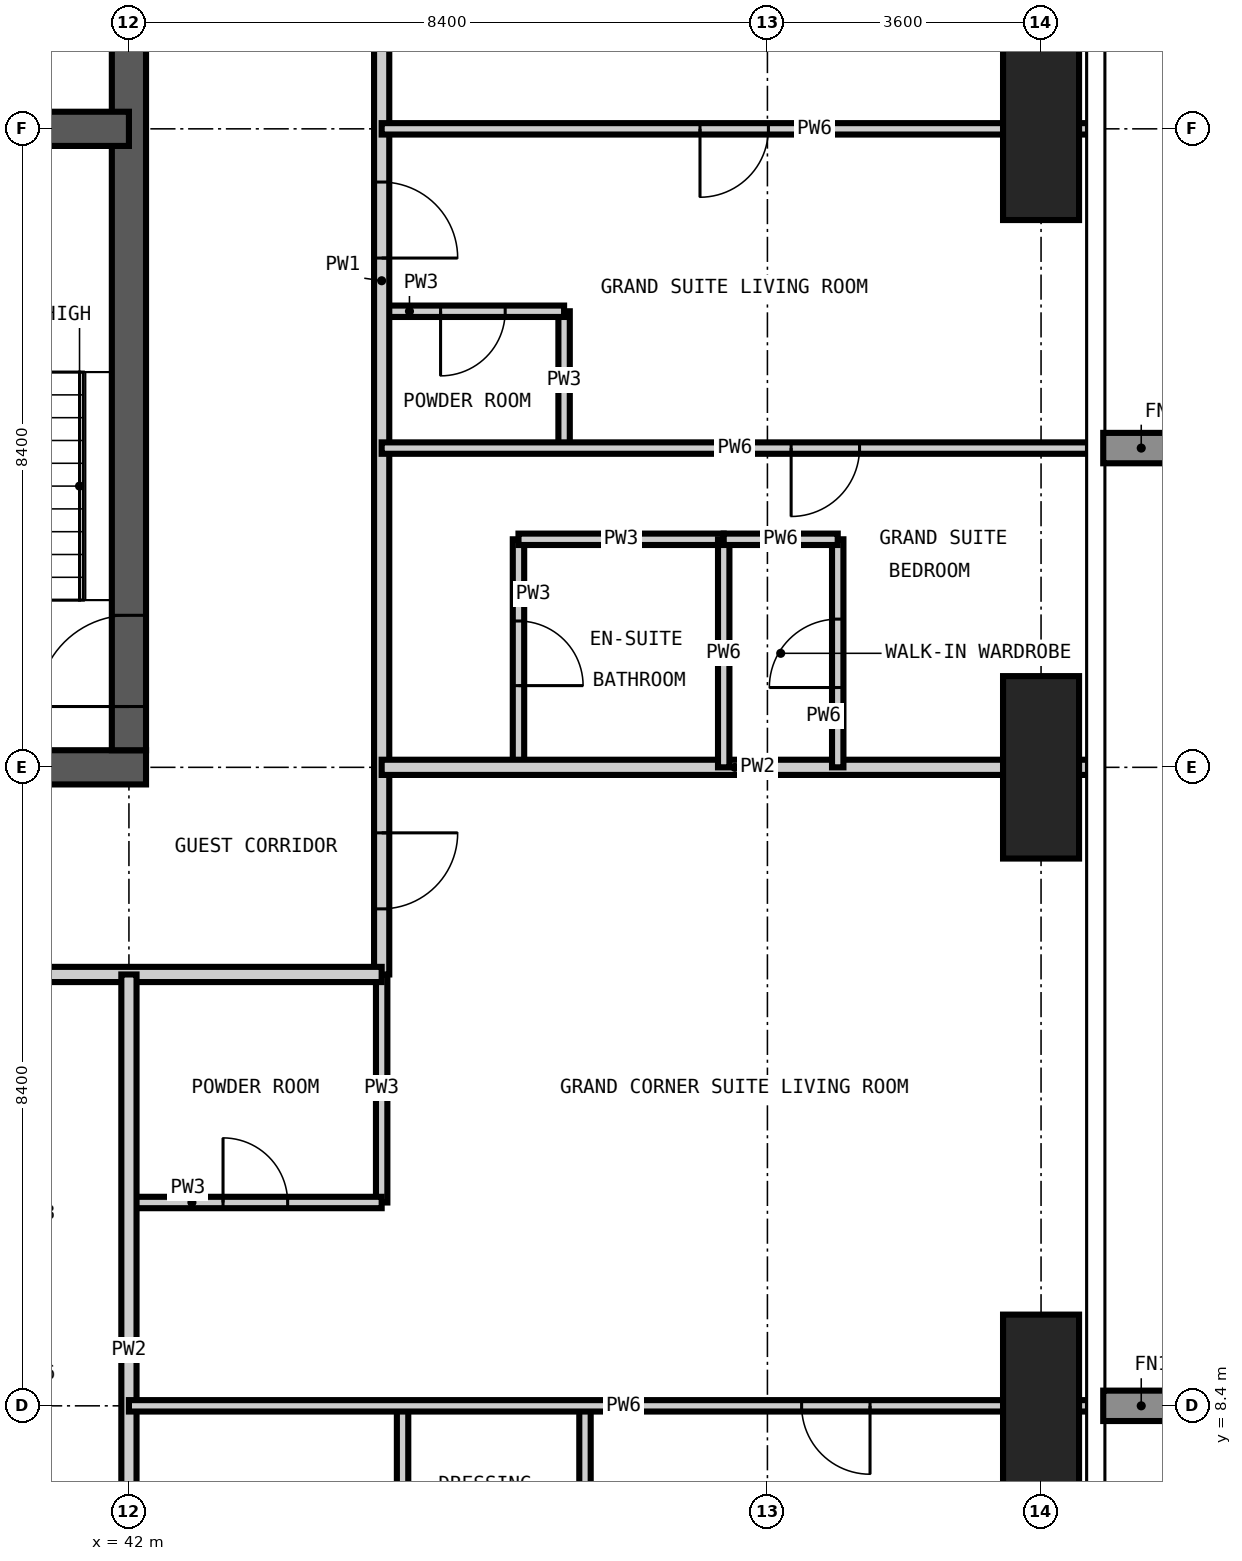
"""IFC4 building model, lengths in metres.
Left out: names, types, materials, properties, quantities, classifications, styles, units other than length and angle.
Written with IfcOpenShell. Run it as: python <this file> out.ifc"""

import sys

from ifc_helpers import new_model, si_unit, direction, frame, frame_2d, origin, origin_2d, place, context, subcontext, project, spatial, rectangle, extrude, element, fill, save


model = new_model("IFC4")
c1 = context("Model", 3, precision=1e-05, world=origin(), true_north=direction((0.0, 1.0)))
c2 = subcontext(c1, "Body", "Model", "MODEL_VIEW")
j1 = project(units=[si_unit("LENGTHUNIT", "METRE"), si_unit("PLANEANGLEUNIT", "RADIAN")], contexts=[c1])
p1 = place(None, origin())
s1 = spatial("IfcSite", under=j1, at=p1, CompositionType="ELEMENT")
p2 = place(p1, origin())
s2 = spatial("IfcBuilding", under=s1, at=p2, CompositionType="ELEMENT")
p3 = place(p2, frame((0.0, 0.0, 264.6)))
s3 = spatial("IfcBuildingStorey", under=s2, at=p3, CompositionType="ELEMENT", Elevation=264.6)
for number, where, z_axis, x_axis in (
    (1, (54.0, 8.4, -0.35), (0.0, 0.0, 1.0), (1.0, 0.0, 0.0)),
    (2, (54.0, 16.8, -0.35), (0.0, 0.0, 1.0), (1.0, 0.0, 0.0)),
    (3, (54.0, 25.2, -0.35), (0.0, 0.0, 1.0), (1.0, 0.0, 0.0)),
):
    element("IfcColumn", number, at=place(p3, frame(where, z_axis=z_axis, x_axis=x_axis)), inside=s3, PredefinedType="COLUMN", context=c2, shape_type="SweptSolid", body=[
        extrude(rectangle(XDim=1.0, YDim=2.4, at=origin_2d()), origin(), (0.0, 0.0, 1.0), 3.9),
    ])
p4 = place(p3, frame((24.975, 16.8, -0.35), z_axis=(0.0, 0.0, 1.0), x_axis=(1.0, 0.0, 0.0)))
e4 = element("IfcWall", 4, at=p4, inside=s3, PredefinedType="SHEAR", context=c2, shape_type="SweptSolid", body=[
    extrude(rectangle(XDim=17.25, YDim=0.45, at=frame_2d((8.625, 0.0))), origin(), (0.0, 0.0, 1.0), 3.9),
])
p5 = place(p4, frame((3.925, 0.0, 0.35)))
e5 = element("IfcOpeningElement", 5, at=p5, cuts=e4, PredefinedType="OPENING", context=c2, shape_type="SweptSolid", body=[
    extrude(rectangle(XDim=1.0, YDim=2.1, at=frame_2d((0.5, 1.05))), frame((0.0, 0.235, 0.0), z_axis=(0.0, -1.0, 0.0), x_axis=(1.0, 0.0, 0.0)), (0.0, 0.0, 1.0), 0.47),
])
p6 = place(p4, frame((10.225, 0.0, 0.35)))
e6 = element("IfcOpeningElement", 6, at=p6, cuts=e4, PredefinedType="OPENING", context=c2, shape_type="SweptSolid", body=[
    extrude(rectangle(XDim=1.0, YDim=2.1, at=frame_2d((0.5, 1.05))), frame((0.0, 0.235, 0.0), z_axis=(0.0, -1.0, 0.0), x_axis=(1.0, 0.0, 0.0)), (0.0, 0.0, 1.0), 0.47),
])
p7 = place(p3, frame((42.0, 17.025, -0.35), z_axis=(0.0, 0.0, 1.0), x_axis=(0.0, 1.0, 0.0)))
e7 = element("IfcWall", 7, at=p7, inside=s3, PredefinedType="SHEAR", context=c2, shape_type="SweptSolid", body=[
    extrude(rectangle(XDim=24.75, YDim=0.45, at=frame_2d((12.375, 0.0))), origin(), (0.0, 0.0, 1.0), 3.9),
])
p8 = place(p7, frame((0.575, 0.0, 0.35)))
e8 = element("IfcOpeningElement", 8, at=p8, cuts=e7, PredefinedType="OPENING", context=c2, shape_type="SweptSolid", body=[
    extrude(rectangle(XDim=1.2, YDim=2.2, at=frame_2d((0.6, 1.1))), frame((0.0, 0.235, 0.0), z_axis=(0.0, -1.0, 0.0), x_axis=(1.0, 0.0, 0.0)), (0.0, 0.0, 1.0), 0.47),
])
p9 = place(p7, frame((11.475, 0.0, 0.35)))
e9 = element("IfcOpeningElement", 9, at=p9, cuts=e7, PredefinedType="OPENING", context=c2, shape_type="SweptSolid", body=[
    extrude(rectangle(XDim=1.8, YDim=2.2, at=frame_2d((0.9, 1.1))), frame((0.0, 0.235, 0.0), z_axis=(0.0, -1.0, 0.0), x_axis=(1.0, 0.0, 0.0)), (0.0, 0.0, 1.0), 0.47),
])
p10 = place(p7, frame((20.275, 0.0, 0.35)))
e10 = element("IfcOpeningElement", 10, at=p10, cuts=e7, PredefinedType="OPENING", context=c2, shape_type="SweptSolid", body=[
    extrude(rectangle(XDim=1.0, YDim=2.1, at=frame_2d((0.5, 1.05))), frame((0.0, 0.235, 0.0), z_axis=(0.0, -1.0, 0.0), x_axis=(1.0, 0.0, 0.0)), (0.0, 0.0, 1.0), 0.47),
])
p11 = place(p3, frame((25.2, 25.2, -0.35), z_axis=(0.0, 0.0, 1.0), x_axis=(1.0, 0.0, 0.0)))
e11 = element("IfcWall", 11, at=p11, inside=s3, PredefinedType="SHEAR", context=c2, shape_type="SweptSolid", body=[
    extrude(rectangle(XDim=16.8, YDim=0.45, at=frame_2d((8.4, 0.0))), origin(), (0.0, 0.0, 1.0), 3.9),
])
p12 = place(p3, frame((45.325, 11.075, 0.0), z_axis=(0.0, 0.0, 1.0), x_axis=(0.0, 1.0, 0.0)))
e12 = element("IfcWall", 12, at=p12, inside=s3, PredefinedType="PARTITIONING", context=c2, shape_type="SweptSolid", body=[
    extrude(rectangle(XDim=3.0, YDim=0.15, at=frame_2d((1.5, 0.0))), origin(), (0.0, 0.0, 1.0), 3.55),
])
p13 = place(p3, frame((47.125, 16.8, 0.0), z_axis=(0.0, 0.0, 1.0), x_axis=(0.0, 1.0, 0.0)))
e13 = element("IfcWall", 13, at=p13, inside=s3, PredefinedType="PARTITIONING", context=c2, shape_type="SweptSolid", body=[
    extrude(rectangle(XDim=3.0, YDim=0.15, at=frame_2d((1.5, 0.0))), origin(), (0.0, 0.0, 1.0), 3.55),
])
p14 = place(p13, frame((1.075, 0.0, 0.0)))
e14 = element("IfcOpeningElement", 14, at=p14, cuts=e13, PredefinedType="OPENING", context=c2, shape_type="SweptSolid", body=[
    extrude(rectangle(XDim=0.85, YDim=2.1, at=frame_2d((0.425, 1.05))), frame((0.0, 0.085, 0.0), z_axis=(0.0, -1.0, 0.0), x_axis=(1.0, 0.0, 0.0)), (0.0, 0.0, 1.0), 0.17),
])
p15 = place(p3, frame((47.725, 21.0, 0.0), z_axis=(0.0, 0.0, 1.0), x_axis=(0.0, 1.0, 0.0)))
e15 = element("IfcWall", 15, at=p15, inside=s3, PredefinedType="PARTITIONING", context=c2, shape_type="SweptSolid", body=[
    extrude(rectangle(XDim=1.8, YDim=0.15, at=frame_2d((0.9, 0.0))), origin(), (0.0, 0.0, 1.0), 3.55),
])
p16 = place(p3, frame((42.0, 11.075, 0.0), z_axis=(0.0, 0.0, 1.0), x_axis=(1.0, 0.0, 0.0)))
e16 = element("IfcWall", 16, at=p16, inside=s3, PredefinedType="PARTITIONING", context=c2, shape_type="SweptSolid", body=[
    extrude(rectangle(XDim=3.325, YDim=0.15, at=frame_2d((1.663, 0.0))), origin(), (0.0, 0.0, 1.0), 3.55),
])
p17 = place(p16, frame((1.238, 0.0, 0.0)))
e17 = element("IfcOpeningElement", 17, at=p17, cuts=e16, PredefinedType="OPENING", context=c2, shape_type="SweptSolid", body=[
    extrude(rectangle(XDim=0.85, YDim=2.1, at=frame_2d((0.425, 1.05))), frame((0.0, 0.085, 0.0), z_axis=(0.0, -1.0, 0.0), x_axis=(1.0, 0.0, 0.0)), (0.0, 0.0, 1.0), 0.17),
])
p18 = place(p3, frame((47.125, 19.8, 0.0), z_axis=(0.0, 0.0, 1.0), x_axis=(1.0, 0.0, 0.0)))
e18 = element("IfcWall", 18, at=p18, inside=s3, PredefinedType="PARTITIONING", context=c2, shape_type="SweptSolid", body=[
    extrude(rectangle(XDim=2.7, YDim=0.15, at=frame_2d((1.35, 0.0))), origin(), (0.0, 0.0, 1.0), 3.55),
])
p19 = place(p3, frame((45.325, 22.8, 0.0), z_axis=(0.0, 0.0, 1.0), x_axis=(1.0, 0.0, 0.0)))
e19 = element("IfcWall", 19, at=p19, inside=s3, PredefinedType="PARTITIONING", context=c2, shape_type="SweptSolid", body=[
    extrude(rectangle(XDim=2.4, YDim=0.15, at=frame_2d((1.2, 0.0))), origin(), (0.0, 0.0, 1.0), 3.55),
])
p20 = place(p19, frame((0.775, 0.0, 0.0)))
e20 = element("IfcOpeningElement", 20, at=p20, cuts=e19, PredefinedType="OPENING", context=c2, shape_type="SweptSolid", body=[
    extrude(rectangle(XDim=0.85, YDim=2.1, at=frame_2d((0.425, 1.05))), frame((0.0, 0.085, 0.0), z_axis=(0.0, -1.0, 0.0), x_axis=(1.0, 0.0, 0.0)), (0.0, 0.0, 1.0), 0.17),
])
p21 = place(p3, frame((45.325, 33.6, 0.0), z_axis=(0.0, 0.0, 1.0), x_axis=(0.0, -1.0, 0.0)))
e21 = element("IfcWall", 21, at=p21, inside=s3, PredefinedType="PARTITIONING", context=c2, shape_type="SweptSolid", body=[
    extrude(rectangle(XDim=19.525, YDim=0.2, at=frame_2d((9.763, 0.0))), origin(), (0.0, 0.0, 1.0), 3.55),
])
p22 = place(p21, frame((9.1, 0.0, 0.0)))
e22 = element("IfcOpeningElement", 22, at=p22, cuts=e21, PredefinedType="OPENING", context=c2, shape_type="SweptSolid", body=[
    extrude(rectangle(XDim=1.0, YDim=2.2, at=frame_2d((0.5, 1.1))), frame((0.0, 0.11, 0.0), z_axis=(0.0, -1.0, 0.0), x_axis=(1.0, 0.0, 0.0)), (0.0, 0.0, 1.0), 0.22),
])
p23 = place(p21, frame((17.662, 0.0, 0.0)))
e23 = element("IfcOpeningElement", 23, at=p23, cuts=e21, PredefinedType="OPENING", context=c2, shape_type="SweptSolid", body=[
    extrude(rectangle(XDim=1.0, YDim=2.2, at=frame_2d((0.5, 1.1))), frame((0.0, 0.11, 0.0), z_axis=(0.0, -1.0, 0.0), x_axis=(1.0, 0.0, 0.0)), (0.0, 0.0, 1.0), 0.22),
])
p24 = place(p3, frame((45.325, 14.075, 0.0), z_axis=(0.0, 0.0, 1.0), x_axis=(-1.0, 0.0, 0.0)))
e24 = element("IfcWall", 24, at=p24, inside=s3, PredefinedType="PARTITIONING", context=c2, shape_type="SweptSolid", body=[
    extrude(rectangle(XDim=22.85, YDim=0.2, at=frame_2d((11.425, 0.0))), origin(), (0.0, 0.0, 1.0), 3.55),
])
p25 = place(p24, frame((17.525, 0.0, 0.0)))
e25 = element("IfcOpeningElement", 25, at=p25, cuts=e24, PredefinedType="OPENING", context=c2, shape_type="SweptSolid", body=[
    extrude(rectangle(XDim=1.0, YDim=2.2, at=frame_2d((0.5, 1.1))), frame((0.0, 0.11, 0.0), z_axis=(0.0, -1.0, 0.0), x_axis=(1.0, 0.0, 0.0)), (0.0, 0.0, 1.0), 0.22),
])
p26 = place(p24, frame((11.225, 0.0, 0.0)))
e26 = element("IfcOpeningElement", 26, at=p26, cuts=e24, PredefinedType="OPENING", context=c2, shape_type="SweptSolid", body=[
    extrude(rectangle(XDim=1.0, YDim=2.2, at=frame_2d((0.5, 1.1))), frame((0.0, 0.11, 0.0), z_axis=(0.0, -1.0, 0.0), x_axis=(1.0, 0.0, 0.0)), (0.0, 0.0, 1.0), 0.22),
])
p27 = place(p24, frame((4.925, 0.0, 0.0)))
e27 = element("IfcOpeningElement", 27, at=p27, cuts=e24, PredefinedType="OPENING", context=c2, shape_type="SweptSolid", body=[
    extrude(rectangle(XDim=1.0, YDim=2.2, at=frame_2d((0.5, 1.1))), frame((0.0, 0.11, 0.0), z_axis=(0.0, -1.0, 0.0), x_axis=(1.0, 0.0, 0.0)), (0.0, 0.0, 1.0), 0.22),
])
p28 = place(p3, frame((42.0, 4.182, 0.0), z_axis=(0.0, 0.0, 1.0), x_axis=(0.0, 1.0, 0.0)))
e28 = element("IfcWall", 28, at=p28, inside=s3, PredefinedType="PARTITIONING", context=c2, shape_type="SweptSolid", body=[
    extrude(rectangle(XDim=9.893, YDim=0.2, at=frame_2d((4.947, 0.0))), origin(), (0.0, 0.0, 1.0), 3.55),
])
p29 = place(p3, frame((45.325, 16.8, 0.0), z_axis=(0.0, 0.0, 1.0), x_axis=(1.0, 0.0, 0.0)))
e29 = element("IfcWall", 29, at=p29, inside=s3, PredefinedType="PARTITIONING", context=c2, shape_type="SweptSolid", body=[
    extrude(rectangle(XDim=9.293, YDim=0.2, at=frame_2d((4.646, 0.0))), origin(), (0.0, 0.0, 1.0), 3.55),
])
p30 = place(p3, frame((45.6, 5.4, 0.0), z_axis=(0.0, 0.0, 1.0), x_axis=(0.0, 1.0, 0.0)))
e30 = element("IfcWall", 30, at=p30, inside=s3, PredefinedType="PARTITIONING", context=c2, shape_type="SweptSolid", body=[
    extrude(rectangle(XDim=3.0, YDim=0.15, at=frame_2d((1.5, 0.0))), origin(), (0.0, 0.0, 1.0), 3.55),
])
p31 = place(p3, frame((48.0, 5.4, 0.0), z_axis=(0.0, 0.0, 1.0), x_axis=(0.0, 1.0, 0.0)))
e31 = element("IfcWall", 31, at=p31, inside=s3, PredefinedType="PARTITIONING", context=c2, shape_type="SweptSolid", body=[
    extrude(rectangle(XDim=3.0, YDim=0.15, at=frame_2d((1.5, 0.0))), origin(), (0.0, 0.0, 1.0), 3.55),
])
p32 = place(p31, frame((1.05, 0.0, 0.0)))
e32 = element("IfcOpeningElement", 32, at=p32, cuts=e31, PredefinedType="OPENING", context=c2, shape_type="SweptSolid", body=[
    extrude(rectangle(XDim=0.9, YDim=2.1, at=frame_2d((0.45, 1.05))), frame((0.0, 0.085, 0.0), z_axis=(0.0, -1.0, 0.0), x_axis=(1.0, 0.0, 0.0)), (0.0, 0.0, 1.0), 0.17),
])
p33 = place(p3, frame((49.825, 16.8, 0.0), z_axis=(0.0, 0.0, 1.0), x_axis=(0.0, 1.0, 0.0)))
e33 = element("IfcWall", 33, at=p33, inside=s3, PredefinedType="PARTITIONING", context=c2, shape_type="SweptSolid", body=[
    extrude(rectangle(XDim=3.0, YDim=0.15, at=frame_2d((1.5, 0.0))), origin(), (0.0, 0.0, 1.0), 3.55),
])
p34 = place(p3, frame((51.325, 16.8, 0.0), z_axis=(0.0, 0.0, 1.0), x_axis=(0.0, 1.0, 0.0)))
e34 = element("IfcWall", 34, at=p34, inside=s3, PredefinedType="PARTITIONING", context=c2, shape_type="SweptSolid", body=[
    extrude(rectangle(XDim=3.0, YDim=0.15, at=frame_2d((1.5, 0.0))), origin(), (0.0, 0.0, 1.0), 3.55),
])
p35 = place(p34, frame((1.05, 0.0, 0.0)))
e35 = element("IfcOpeningElement", 35, at=p35, cuts=e34, PredefinedType="OPENING", context=c2, shape_type="SweptSolid", body=[
    extrude(rectangle(XDim=0.9, YDim=2.1, at=frame_2d((0.45, 1.05))), frame((0.0, 0.085, 0.0), z_axis=(0.0, -1.0, 0.0), x_axis=(1.0, 0.0, 0.0)), (0.0, 0.0, 1.0), 0.17),
])
p36 = place(p3, frame((42.0, 8.4, 0.0), z_axis=(0.0, 0.0, 1.0), x_axis=(1.0, 0.0, 0.0)))
e36 = element("IfcWall", 36, at=p36, inside=s3, PredefinedType="PARTITIONING", context=c2, shape_type="SweptSolid", body=[
    extrude(rectangle(XDim=12.618, YDim=0.15, at=frame_2d((6.309, 0.0))), origin(), (0.0, 0.0, 1.0), 3.55),
])
p37 = place(p36, frame((8.85, 0.0, 0.0)))
e37 = element("IfcOpeningElement", 37, at=p37, cuts=e36, PredefinedType="OPENING", context=c2, shape_type="SweptSolid", body=[
    extrude(rectangle(XDim=0.9, YDim=2.1, at=frame_2d((0.45, 1.05))), frame((0.0, 0.085, 0.0), z_axis=(0.0, -1.0, 0.0), x_axis=(1.0, 0.0, 0.0)), (0.0, 0.0, 1.0), 0.17),
])
p38 = place(p3, frame((49.825, 19.8, 0.0), z_axis=(0.0, 0.0, 1.0), x_axis=(1.0, 0.0, 0.0)))
e38 = element("IfcWall", 38, at=p38, inside=s3, PredefinedType="PARTITIONING", context=c2, shape_type="SweptSolid", body=[
    extrude(rectangle(XDim=1.5, YDim=0.15, at=frame_2d((0.75, 0.0))), origin(), (0.0, 0.0, 1.0), 3.55),
])
p39 = place(p3, frame((45.325, 21.0, 0.0), z_axis=(0.0, 0.0, 1.0), x_axis=(1.0, 0.0, 0.0)))
e39 = element("IfcWall", 39, at=p39, inside=s3, PredefinedType="PARTITIONING", context=c2, shape_type="SweptSolid", body=[
    extrude(rectangle(XDim=9.293, YDim=0.15, at=frame_2d((4.646, 0.0))), origin(), (0.0, 0.0, 1.0), 3.55),
])
p40 = place(p39, frame((5.387, 0.0, 0.0)))
e40 = element("IfcOpeningElement", 40, at=p40, cuts=e39, PredefinedType="OPENING", context=c2, shape_type="SweptSolid", body=[
    extrude(rectangle(XDim=0.9, YDim=2.1, at=frame_2d((0.45, 1.05))), frame((0.0, 0.085, 0.0), z_axis=(0.0, -1.0, 0.0), x_axis=(1.0, 0.0, 0.0)), (0.0, 0.0, 1.0), 0.17),
])
p41 = place(p3, frame((45.325, 25.2, 0.0), z_axis=(0.0, 0.0, 1.0), x_axis=(1.0, 0.0, 0.0)))
e41 = element("IfcWall", 41, at=p41, inside=s3, PredefinedType="PARTITIONING", context=c2, shape_type="SweptSolid", body=[
    extrude(rectangle(XDim=9.293, YDim=0.15, at=frame_2d((4.646, 0.0))), origin(), (0.0, 0.0, 1.0), 3.55),
])
p42 = place(p41, frame((4.188, 0.0, 0.0)))
e42 = element("IfcOpeningElement", 42, at=p42, cuts=e41, PredefinedType="OPENING", context=c2, shape_type="SweptSolid", body=[
    extrude(rectangle(XDim=0.9, YDim=2.1, at=frame_2d((0.45, 1.05))), frame((0.0, 0.085, 0.0), z_axis=(0.0, -1.0, 0.0), x_axis=(1.0, 0.0, 0.0)), (0.0, 0.0, 1.0), 0.17),
])
p43 = place(p8, origin())
e43 = element("IfcDoor", 43, at=p43, inside=s3, OperationType="SINGLE_SWING_LEFT", PredefinedType="DOOR", context=c2, shape_type="SweptSolid", body=[
    extrude(rectangle(XDim=1.2, YDim=2.2, at=frame_2d((0.6, 1.1))), frame((0.0, 0.025, 0.0), z_axis=(0.0, -1.0, 0.0), x_axis=(1.0, 0.0, 0.0)), (0.0, 0.0, 1.0), 0.05),
])
fill(e8, e43)
p44 = place(p22, origin())
e44 = element("IfcDoor", 44, at=p44, inside=s3, OperationType="SINGLE_SWING_RIGHT", PredefinedType="DOOR", context=c2, shape_type="SweptSolid", body=[
    extrude(rectangle(XDim=1.0, YDim=2.2, at=frame_2d((0.5, 1.1))), frame((0.0, 0.025, 0.0), z_axis=(0.0, -1.0, 0.0), x_axis=(1.0, 0.0, 0.0)), (0.0, 0.0, 1.0), 0.05),
])
fill(e22, e44)
p45 = place(p20, frame((0.85, 0.0, 0.0), z_axis=(0.0, 0.0, 1.0), x_axis=(-1.0, 0.0, 0.0)))
e45 = element("IfcDoor", 45, at=p45, inside=s3, OperationType="SINGLE_SWING_RIGHT", PredefinedType="DOOR", context=c2, shape_type="SweptSolid", body=[
    extrude(rectangle(XDim=0.85, YDim=2.1, at=frame_2d((0.425, 1.05))), frame((0.0, 0.025, 0.0), z_axis=(0.0, -1.0, 0.0), x_axis=(1.0, 0.0, 0.0)), (0.0, 0.0, 1.0), 0.05),
])
fill(e20, e45)
p46 = place(p40, frame((0.9, 0.0, 0.0), z_axis=(0.0, 0.0, 1.0), x_axis=(-1.0, 0.0, 0.0)))
e46 = element("IfcDoor", 46, at=p46, inside=s3, OperationType="SINGLE_SWING_RIGHT", PredefinedType="DOOR", context=c2, shape_type="SweptSolid", body=[
    extrude(rectangle(XDim=0.9, YDim=2.1, at=frame_2d((0.45, 1.05))), frame((0.0, 0.025, 0.0), z_axis=(0.0, -1.0, 0.0), x_axis=(1.0, 0.0, 0.0)), (0.0, 0.0, 1.0), 0.05),
])
fill(e40, e46)
p47 = place(p14, frame((0.85, 0.0, 0.0), z_axis=(0.0, 0.0, 1.0), x_axis=(-1.0, 0.0, 0.0)))
e47 = element("IfcDoor", 47, at=p47, inside=s3, OperationType="SINGLE_SWING_RIGHT", PredefinedType="DOOR", context=c2, shape_type="SweptSolid", body=[
    extrude(rectangle(XDim=0.85, YDim=2.1, at=frame_2d((0.425, 1.05))), frame((0.0, 0.025, 0.0), z_axis=(0.0, -1.0, 0.0), x_axis=(1.0, 0.0, 0.0)), (0.0, 0.0, 1.0), 0.05),
])
fill(e14, e47)
p48 = place(p35, origin())
e48 = element("IfcDoor", 48, at=p48, inside=s3, OperationType="SINGLE_SWING_LEFT", PredefinedType="DOOR", context=c2, shape_type="SweptSolid", body=[
    extrude(rectangle(XDim=0.9, YDim=2.1, at=frame_2d((0.45, 1.05))), frame((0.0, 0.025, 0.0), z_axis=(0.0, -1.0, 0.0), x_axis=(1.0, 0.0, 0.0)), (0.0, 0.0, 1.0), 0.05),
])
fill(e35, e48)
p49 = place(p42, frame((0.9, 0.0, 0.0), z_axis=(0.0, 0.0, 1.0), x_axis=(-1.0, 0.0, 0.0)))
e49 = element("IfcDoor", 49, at=p49, inside=s3, OperationType="SINGLE_SWING_RIGHT", PredefinedType="DOOR", context=c2, shape_type="SweptSolid", body=[
    extrude(rectangle(XDim=0.9, YDim=2.1, at=frame_2d((0.45, 1.05))), frame((0.0, 0.025, 0.0), z_axis=(0.0, -1.0, 0.0), x_axis=(1.0, 0.0, 0.0)), (0.0, 0.0, 1.0), 0.05),
])
fill(e42, e49)
p50 = place(p23, origin())
e50 = element("IfcDoor", 50, at=p50, inside=s3, OperationType="SINGLE_SWING_LEFT", PredefinedType="DOOR", context=c2, shape_type="SweptSolid", body=[
    extrude(rectangle(XDim=1.0, YDim=2.2, at=frame_2d((0.5, 1.1))), frame((0.0, 0.025, 0.0), z_axis=(0.0, -1.0, 0.0), x_axis=(1.0, 0.0, 0.0)), (0.0, 0.0, 1.0), 0.05),
])
fill(e23, e50)
p51 = place(p17, origin())
e51 = element("IfcDoor", 51, at=p51, inside=s3, OperationType="SINGLE_SWING_LEFT", PredefinedType="DOOR", context=c2, shape_type="SweptSolid", body=[
    extrude(rectangle(XDim=0.85, YDim=2.1, at=frame_2d((0.425, 1.05))), frame((0.0, 0.025, 0.0), z_axis=(0.0, -1.0, 0.0), x_axis=(1.0, 0.0, 0.0)), (0.0, 0.0, 1.0), 0.05),
])
fill(e17, e51)
p52 = place(p37, frame((0.9, 0.0, 0.0), z_axis=(0.0, 0.0, 1.0), x_axis=(-1.0, 0.0, 0.0)))
e52 = element("IfcDoor", 52, at=p52, inside=s3, OperationType="SINGLE_SWING_LEFT", PredefinedType="DOOR", context=c2, shape_type="SweptSolid", body=[
    extrude(rectangle(XDim=0.9, YDim=2.1, at=frame_2d((0.45, 1.05))), frame((0.0, 0.025, 0.0), z_axis=(0.0, -1.0, 0.0), x_axis=(1.0, 0.0, 0.0)), (0.0, 0.0, 1.0), 0.05),
])
fill(e37, e52)
save(model, sys.argv[1])
